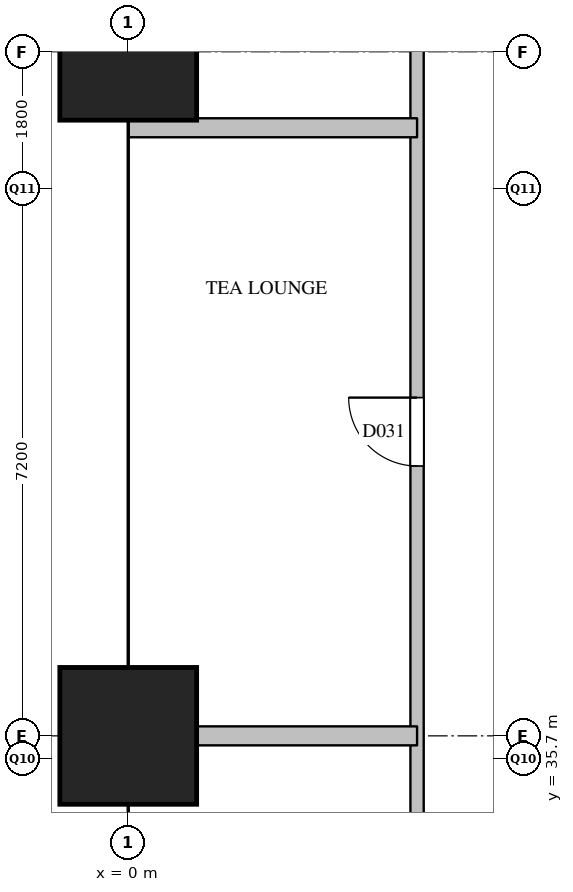
"""IFC4 building model, lengths in metres.
Left out: names, types, materials, properties, quantities, classifications, styles, units other than length and angle.
Written with IfcOpenShell. Run it as: python <this file> out.ifc"""

import sys

from ifc_helpers import new_model, si_unit, direction, frame, frame_2d, origin, origin_2d, place, context, subcontext, project, spatial, rectangle, extrude, element, fill, save


model = new_model("IFC4")
c1 = context("Model", 3, precision=1e-05, world=origin(), true_north=direction((0.0, 1.0)))
c2 = subcontext(c1, "Body", "Model", "MODEL_VIEW")
j1 = project(units=[si_unit("LENGTHUNIT", "METRE"), si_unit("PLANEANGLEUNIT", "RADIAN")], contexts=[c1])
p1 = place(None, origin())
s1 = spatial("IfcSite", under=j1, at=p1, CompositionType="ELEMENT")
p2 = place(p1, origin())
s2 = spatial("IfcBuilding", under=s1, at=p2, CompositionType="ELEMENT")
p3 = place(p2, frame((0.0, 0.0, 81.6)))
s3 = spatial("IfcBuildingStorey", under=s2, at=p3, CompositionType="ELEMENT", Elevation=81.6)
for number, where, z_axis, x_axis in (
    (1, (0.0, 36.0, 0.0), (0.0, 0.0, 1.0), (1.0, 0.0, 0.0)),
    (2, (0.0, 45.0, 0.0), (0.0, 0.0, 1.0), (1.0, 0.0, 0.0)),
):
    element("IfcColumn", number, at=place(p3, frame(where, z_axis=z_axis, x_axis=x_axis)), inside=s3, PredefinedType="COLUMN", context=c2, shape_type="SweptSolid", body=[
        extrude(rectangle(XDim=1.8, YDim=1.8, at=origin_2d()), origin(), (0.0, 0.0, 1.0), 3.8),
    ])
p4 = place(p3, frame((3.8, 28.5, 0.0), z_axis=(0.0, 0.0, 1.0), x_axis=(0.0, 1.0, 0.0)))
e3 = element("IfcWall", 3, at=p4, inside=s3, PredefinedType="PARTITIONING", context=c2, shape_type="SweptSolid", body=[
    extrude(rectangle(XDim=23.3, YDim=0.175, at=frame_2d((11.65, 0.0))), origin(), (0.0, 0.0, 1.0), 3.5),
])
p5 = place(p4, frame((3.3, 0.0, 0.0)))
e4 = element("IfcOpeningElement", 4, at=p5, cuts=e3, PredefinedType="OPENING", context=c2, shape_type="SweptSolid", body=[
    extrude(rectangle(XDim=0.9, YDim=2.1, at=frame_2d((0.45, 1.05))), frame((0.0, 0.097, 0.0), z_axis=(0.0, -1.0, 0.0), x_axis=(1.0, 0.0, 0.0)), (0.0, 0.0, 1.0), 0.195),
])
p6 = place(p4, frame((11.05, 0.0, 0.0)))
e5 = element("IfcOpeningElement", 5, at=p6, cuts=e3, PredefinedType="OPENING", context=c2, shape_type="SweptSolid", body=[
    extrude(rectangle(XDim=0.9, YDim=2.1, at=frame_2d((0.45, 1.05))), frame((0.0, 0.097, 0.0), z_axis=(0.0, -1.0, 0.0), x_axis=(1.0, 0.0, 0.0)), (0.0, 0.0, 1.0), 0.195),
])
p7 = place(p4, frame((18.95, 0.0, 0.0)))
e6 = element("IfcOpeningElement", 6, at=p7, cuts=e3, PredefinedType="OPENING", context=c2, shape_type="SweptSolid", body=[
    extrude(rectangle(XDim=0.9, YDim=2.1, at=frame_2d((0.45, 1.05))), frame((0.0, 0.097, 0.0), z_axis=(0.0, -1.0, 0.0), x_axis=(1.0, 0.0, 0.0)), (0.0, 0.0, 1.0), 0.195),
])
p8 = place(p3, frame((0.0, 36.0, 0.0), z_axis=(0.0, 0.0, 1.0), x_axis=(1.0, 0.0, 0.0)))
e7 = element("IfcWall", 7, at=p8, inside=s3, PredefinedType="PARTITIONING", context=c2, shape_type="SweptSolid", body=[
    extrude(rectangle(XDim=3.8, YDim=0.25, at=frame_2d((1.9, 0.0))), origin(), (0.0, 0.0, 1.0), 3.5),
])
p9 = place(p3, frame((0.0, 44.0, 0.0), z_axis=(0.0, 0.0, 1.0), x_axis=(1.0, 0.0, 0.0)))
e8 = element("IfcWall", 8, at=p9, inside=s3, PredefinedType="PARTITIONING", context=c2, shape_type="SweptSolid", body=[
    extrude(rectangle(XDim=3.8, YDim=0.25, at=frame_2d((1.9, 0.0))), origin(), (0.0, 0.0, 1.0), 2.5),
])
p10 = place(p6, origin())
e9 = element("IfcDoor", 9, at=p10, inside=s3, OperationType="SINGLE_SWING_RIGHT", PredefinedType="DOOR", context=c2, shape_type="SweptSolid", body=[
    extrude(rectangle(XDim=0.9, YDim=2.1, at=frame_2d((0.45, 1.05))), frame((0.0, 0.025, 0.0), z_axis=(0.0, -1.0, 0.0), x_axis=(1.0, 0.0, 0.0)), (0.0, 0.0, 1.0), 0.05),
])
fill(e5, e9)
save(model, sys.argv[1])
